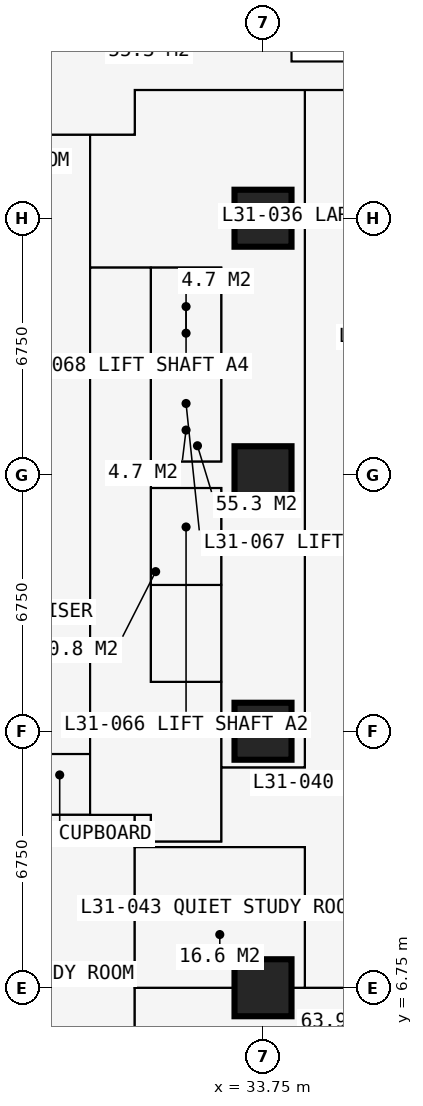
"""IFC4 building model, lengths in metres.
Left out: names, types, materials, properties, quantities, classifications, styles, units other than length and angle.
Written with IfcOpenShell. Run it as: python <this file> out.ifc"""

import sys

from ifc_helpers import new_model, si_unit, direction, frame, frame_2d, origin, origin_2d, place, context, subcontext, project, spatial, rectangle, extrude, element, fill, save


model = new_model("IFC4")
c1 = context("Model", 3, precision=1e-05, world=origin(), true_north=direction((0.0, 1.0)))
c2 = subcontext(c1, "Body", "Model", "MODEL_VIEW")
j1 = project(units=[si_unit("LENGTHUNIT", "METRE"), si_unit("PLANEANGLEUNIT", "RADIAN")], contexts=[c1])
p1 = place(None, origin())
s1 = spatial("IfcSite", under=j1, at=p1, CompositionType="ELEMENT")
p2 = place(p1, origin())
s2 = spatial("IfcBuilding", under=s1, at=p2, CompositionType="ELEMENT")
p3 = place(p2, frame((0.0, 0.0, 116.1)))
s3 = spatial("IfcBuildingStorey", under=s2, at=p3, CompositionType="ELEMENT", Elevation=116.1)
for number, where, z_axis, x_axis in (
    (1, (33.75, 6.75, 0.0), (0.0, 0.0, 1.0), (1.0, 0.0, 0.0)),
    (2, (33.75, 13.5, 0.0), (0.0, 0.0, 1.0), (1.0, 0.0, 0.0)),
    (3, (33.75, 20.25, 0.0), (0.0, 0.0, 1.0), (1.0, 0.0, 0.0)),
    (4, (33.75, 27.0, 0.0), (0.0, 0.0, 1.0), (1.0, 0.0, 0.0)),
):
    element("IfcColumn", number, at=place(p3, frame(where, z_axis=z_axis, x_axis=x_axis)), inside=s3, PredefinedType="COLUMN", context=c2, shape_type="SweptSolid", body=[
        extrude(rectangle(XDim=1.5, YDim=1.5, at=origin_2d()), origin(), (0.0, 0.0, 1.0), 3.6),
    ])
p4 = place(p3, frame((37.875, 31.125, 0.0), z_axis=(0.0, 0.0, 1.0), x_axis=(-1.0, 0.0, 0.0)))
e5 = element("IfcWall", 5, at=p4, inside=s3, PredefinedType="SOLIDWALL", context=c2, shape_type="SweptSolid", body=[
    extrude(rectangle(XDim=3.375, YDim=0.3, at=frame_2d((1.688, 0.0))), origin(), (0.0, 0.0, 1.0), 3.375),
])
p5 = place(p4, frame((0.788, 0.0, 0.6)))
e6 = element("IfcOpeningElement", 6, at=p5, cuts=e5, PredefinedType="OPENING", context=c2, shape_type="SweptSolid", body=[
    extrude(rectangle(XDim=1.8, YDim=2.1, at=frame_2d((0.9, 1.05))), frame((0.0, 0.16, 0.0), z_axis=(0.0, -1.0, 0.0), x_axis=(1.0, 0.0, 0.0)), (0.0, 0.0, 1.0), 0.32),
])
p6 = place(p3, frame((34.5, 31.125, 0.0), z_axis=(0.0, 0.0, 1.0), x_axis=(0.0, 1.0, 0.0)))
e7 = element("IfcWall", 7, at=p6, inside=s3, PredefinedType="SOLIDWALL", context=c2, shape_type="SweptSolid", body=[
    extrude(rectangle(XDim=3.375, YDim=0.3, at=frame_2d((1.688, 0.0))), origin(), (0.0, 0.0, 1.0), 3.375),
])
p7 = place(p6, frame((0.268, 0.0, 0.9)))
e8 = element("IfcOpeningElement", 8, at=p7, cuts=e7, PredefinedType="OPENING", context=c2, shape_type="SweptSolid", body=[
    extrude(rectangle(XDim=1.5, YDim=1.8, at=frame_2d((0.75, 0.9))), frame((0.0, 0.16, 0.0), z_axis=(0.0, -1.0, 0.0), x_axis=(1.0, 0.0, 0.0)), (0.0, 0.0, 1.0), 0.32),
])
p8 = place(p3, frame((10.125, 11.3, 0.0), z_axis=(0.0, 0.0, 1.0), x_axis=(1.0, 0.0, 0.0)))
e9 = element("IfcWall", 9, at=p8, inside=s3, PredefinedType="PARTITIONING", context=c2, shape_type="SweptSolid", body=[
    extrude(rectangle(XDim=20.675, YDim=0.15, at=frame_2d((10.337, 0.0))), origin(), (0.0, 0.0, 1.0), 3.375),
])
p9 = place(p8, frame((8.375, 0.0, 0.0)))
e10 = element("IfcOpeningElement", 10, at=p9, cuts=e9, PredefinedType="OPENING", context=c2, shape_type="SweptSolid", body=[
    extrude(rectangle(XDim=1.0, YDim=2.2, at=frame_2d((0.5, 1.1))), frame((0.0, 0.085, 0.0), z_axis=(0.0, -1.0, 0.0), x_axis=(1.0, 0.0, 0.0)), (0.0, 0.0, 1.0), 0.17),
])
p10 = place(p8, frame((10.975, 0.0, 0.0)))
e11 = element("IfcOpeningElement", 11, at=p10, cuts=e9, PredefinedType="OPENING", context=c2, shape_type="SweptSolid", body=[
    extrude(rectangle(XDim=1.0, YDim=2.2, at=frame_2d((0.5, 1.1))), frame((0.0, 0.085, 0.0), z_axis=(0.0, -1.0, 0.0), x_axis=(1.0, 0.0, 0.0)), (0.0, 0.0, 1.0), 0.17),
])
p11 = place(p8, frame((3.925, 0.0, 0.0)))
e12 = element("IfcOpeningElement", 12, at=p11, cuts=e9, PredefinedType="OPENING", context=c2, shape_type="SweptSolid", body=[
    extrude(rectangle(XDim=0.95, YDim=2.2, at=frame_2d((0.475, 1.1))), frame((0.0, 0.085, 0.0), z_axis=(0.0, -1.0, 0.0), x_axis=(1.0, 0.0, 0.0)), (0.0, 0.0, 1.0), 0.17),
])
p12 = place(p3, frame((11.3, 29.2, 0.0), z_axis=(0.0, 0.0, 1.0), x_axis=(1.0, 0.0, 0.0)))
e13 = element("IfcWall", 13, at=p12, inside=s3, PredefinedType="PARTITIONING", context=c2, shape_type="SweptSolid", body=[
    extrude(rectangle(XDim=19.075, YDim=0.15, at=frame_2d((9.538, 0.0))), origin(), (0.0, 0.0, 1.0), 3.375),
])
p13 = place(p12, frame((5.825, 0.0, 0.0)))
e14 = element("IfcOpeningElement", 14, at=p13, cuts=e13, PredefinedType="OPENING", context=c2, shape_type="SweptSolid", body=[
    extrude(rectangle(XDim=0.95, YDim=2.2, at=frame_2d((0.475, 1.1))), frame((0.0, 0.085, 0.0), z_axis=(0.0, -1.0, 0.0), x_axis=(1.0, 0.0, 0.0)), (0.0, 0.0, 1.0), 0.17),
])
p14 = place(p12, frame((9.2, 0.0, 0.0)))
e15 = element("IfcOpeningElement", 15, at=p14, cuts=e13, PredefinedType="OPENING", context=c2, shape_type="SweptSolid", body=[
    extrude(rectangle(XDim=0.95, YDim=2.2, at=frame_2d((0.475, 1.1))), frame((0.0, 0.085, 0.0), z_axis=(0.0, -1.0, 0.0), x_axis=(1.0, 0.0, 0.0)), (0.0, 0.0, 1.0), 0.17),
])
p15 = place(p12, frame((0.6, 0.0, 0.0)))
e16 = element("IfcOpeningElement", 16, at=p15, cuts=e13, PredefinedType="OPENING", context=c2, shape_type="SweptSolid", body=[
    extrude(rectangle(XDim=1.0, YDim=2.2, at=frame_2d((0.5, 1.1))), frame((0.0, 0.085, 0.0), z_axis=(0.0, -1.0, 0.0), x_axis=(1.0, 0.0, 0.0)), (0.0, 0.0, 1.0), 0.17),
])
p16 = place(p3, frame((27.6, 12.9, 0.0), z_axis=(0.0, 0.0, 1.0), x_axis=(1.0, 0.0, 0.0)))
e17 = element("IfcWall", 17, at=p16, inside=s3, PredefinedType="PARTITIONING", context=c2, shape_type="SweptSolid", body=[
    extrude(rectangle(XDim=1.6, YDim=0.15, at=frame_2d((0.8, 0.0))), origin(), (0.0, 0.0, 1.0), 2.806),
])
p17 = place(p3, frame((29.2, 11.3, 0.0), z_axis=(0.0, 0.0, 1.0), x_axis=(0.0, 1.0, 0.0)))
e18 = element("IfcWall", 18, at=p17, inside=s3, PredefinedType="PARTITIONING", context=c2, shape_type="SweptSolid", body=[
    extrude(rectangle(XDim=17.9, YDim=0.2, at=frame_2d((8.95, 0.0))), origin(), (0.0, 0.0, 1.0), 3.375),
])
p18 = place(p17, frame((8.35, 0.0, 0.0)))
e19 = element("IfcOpeningElement", 19, at=p18, cuts=e18, PredefinedType="OPENING", context=c2, shape_type="SweptSolid", body=[
    extrude(rectangle(XDim=1.2, YDim=2.2, at=frame_2d((0.6, 1.1))), frame((0.0, 0.11, 0.0), z_axis=(0.0, -1.0, 0.0), x_axis=(1.0, 0.0, 0.0)), (0.0, 0.0, 1.0), 0.22),
])
p19 = place(p3, frame((29.2, 25.7, 0.0), z_axis=(0.0, 0.0, 1.0), x_axis=(1.0, 0.0, 0.0)))
e20 = element("IfcWall", 20, at=p19, inside=s3, PredefinedType="SHEAR", context=c2, shape_type="SweptSolid", body=[
    extrude(rectangle(XDim=3.45, YDim=0.1, at=frame_2d((1.725, 0.0))), origin(), (0.0, 0.0, 1.0), 3.375),
])
p20 = place(p3, frame((30.375, -0.734, 0.0), z_axis=(0.0, 0.0, 1.0), x_axis=(0.0, 1.0, 0.0)))
e21 = element("IfcWall", 21, at=p20, inside=s3, PredefinedType="PARTITIONING", context=c2, shape_type="SweptSolid", body=[
    extrude(rectangle(XDim=12.034, YDim=0.15, at=frame_2d((6.017, 0.0))), origin(), (0.0, 0.0, 1.0), 3.375),
])
p21 = place(p20, frame((5.134, 0.0, 0.0)))
e22 = element("IfcOpeningElement", 22, at=p21, cuts=e21, PredefinedType="OPENING", context=c2, shape_type="SweptSolid", body=[
    extrude(rectangle(XDim=1.0, YDim=2.2, at=frame_2d((0.5, 1.1))), frame((0.0, 0.085, 0.0), z_axis=(0.0, -1.0, 0.0), x_axis=(1.0, 0.0, 0.0)), (0.0, 0.0, 1.0), 0.17),
])
p22 = place(p3, frame((30.375, 6.75, 0.0), z_axis=(0.0, 0.0, 1.0), x_axis=(1.0, 0.0, 0.0)))
e23 = element("IfcWall", 23, at=p22, inside=s3, PredefinedType="PARTITIONING", context=c2, shape_type="SweptSolid", body=[
    extrude(rectangle(XDim=5.975, YDim=0.15, at=frame_2d((2.988, 0.0))), origin(), (0.0, 0.0, 1.0), 2.877),
])
p23 = place(p3, frame((30.375, 10.45, 0.0), z_axis=(0.0, 0.0, 1.0), x_axis=(1.0, 0.0, 0.0)))
e24 = element("IfcWall", 24, at=p23, inside=s3, PredefinedType="PARTITIONING", context=c2, shape_type="SweptSolid", body=[
    extrude(rectangle(XDim=4.475, YDim=0.15, at=frame_2d((2.238, 0.0))), origin(), (0.0, 0.0, 1.0), 3.375),
])
p24 = place(p23, frame((2.35, 0.0, 0.0)))
e25 = element("IfcOpeningElement", 25, at=p24, cuts=e24, PredefinedType="OPENING", context=c2, shape_type="SweptSolid", body=[
    extrude(rectangle(XDim=0.95, YDim=2.2, at=frame_2d((0.475, 1.1))), frame((0.0, 0.085, 0.0), z_axis=(0.0, -1.0, 0.0), x_axis=(1.0, 0.0, 0.0)), (0.0, 0.0, 1.0), 0.17),
])
p25 = place(p3, frame((30.375, 29.2, 0.0), z_axis=(0.0, 0.0, 1.0), x_axis=(0.0, 1.0, 0.0)))
e26 = element("IfcWall", 26, at=p25, inside=s3, PredefinedType="PARTITIONING", context=c2, shape_type="SweptSolid", body=[
    extrude(rectangle(XDim=1.175, YDim=0.15, at=frame_2d((0.587, 0.0))), origin(), (0.0, 0.0, 1.0), 3.375),
])
p26 = place(p3, frame((30.375, 30.375, 0.0), z_axis=(0.0, 0.0, 1.0), x_axis=(1.0, 0.0, 0.0)))
e27 = element("IfcWall", 27, at=p26, inside=s3, PredefinedType="PARTITIONING", context=c2, shape_type="SweptSolid", body=[
    extrude(rectangle(XDim=7.35, YDim=0.15, at=frame_2d((3.675, 0.0))), origin(), (0.0, 0.0, 1.0), 2.877),
])
p27 = place(p26, frame((5.225, 0.0, 0.0)))
e28 = element("IfcOpeningElement", 28, at=p27, cuts=e27, PredefinedType="OPENING", context=c2, shape_type="SweptSolid", body=[
    extrude(rectangle(XDim=1.0, YDim=2.2, at=frame_2d((0.5, 1.1))), frame((0.0, 0.085, 0.0), z_axis=(0.0, -1.0, 0.0), x_axis=(1.0, 0.0, 0.0)), (0.0, 0.0, 1.0), 0.17),
])
p28 = place(p3, frame((30.8, 10.6, 0.0), z_axis=(0.0, 0.0, 1.0), x_axis=(0.0, 1.0, 0.0)))
e29 = element("IfcWall", 29, at=p28, inside=s3, PredefinedType="PARTITIONING", context=c2, shape_type="SweptSolid", body=[
    extrude(rectangle(XDim=0.7, YDim=0.15, at=frame_2d((0.35, 0.0))), origin(), (0.0, 0.0, 1.0), 3.375),
])
p29 = place(p3, frame((30.8, 10.6, 0.0), z_axis=(0.0, 0.0, 1.0), x_axis=(1.0, 0.0, 0.0)))
e30 = element("IfcWall", 30, at=p29, inside=s3, PredefinedType="PARTITIONING", context=c2, shape_type="SweptSolid", body=[
    extrude(rectangle(XDim=1.85, YDim=0.15, at=frame_2d((0.925, 0.0))), origin(), (0.0, 0.0, 1.0), 3.375),
])
p30 = place(p3, frame((30.8, 14.8, 0.0), z_axis=(0.0, 0.0, 1.0), x_axis=(0.0, 1.0, 0.0)))
e31 = element("IfcWall", 31, at=p30, inside=s3, PredefinedType="PARTITIONING", context=c2, shape_type="SweptSolid", body=[
    extrude(rectangle(XDim=10.9, YDim=0.15, at=frame_2d((5.45, 0.0))), origin(), (0.0, 0.0, 1.0), 3.375),
])
p31 = place(p30, frame((0.75, 0.0, 0.0)))
e32 = element("IfcOpeningElement", 32, at=p31, cuts=e31, PredefinedType="OPENING", context=c2, shape_type="SweptSolid", body=[
    extrude(rectangle(XDim=1.1, YDim=2.2, at=frame_2d((0.55, 1.1))), frame((0.0, 0.085, 0.0), z_axis=(0.0, -1.0, 0.0), x_axis=(1.0, 0.0, 0.0)), (0.0, 0.0, 1.0), 0.17),
])
p32 = place(p30, frame((3.25, 0.0, 0.0)))
e33 = element("IfcOpeningElement", 33, at=p32, cuts=e31, PredefinedType="OPENING", context=c2, shape_type="SweptSolid", body=[
    extrude(rectangle(XDim=1.1, YDim=2.2, at=frame_2d((0.55, 1.1))), frame((0.0, 0.085, 0.0), z_axis=(0.0, -1.0, 0.0), x_axis=(1.0, 0.0, 0.0)), (0.0, 0.0, 1.0), 0.17),
])
p33 = place(p30, frame((6.5, 0.0, 0.0)))
e34 = element("IfcOpeningElement", 34, at=p33, cuts=e31, PredefinedType="OPENING", context=c2, shape_type="SweptSolid", body=[
    extrude(rectangle(XDim=1.1, YDim=2.2, at=frame_2d((0.55, 1.1))), frame((0.0, 0.085, 0.0), z_axis=(0.0, -1.0, 0.0), x_axis=(1.0, 0.0, 0.0)), (0.0, 0.0, 1.0), 0.17),
])
p34 = place(p30, frame((9.05, 0.0, 0.0)))
e35 = element("IfcOpeningElement", 35, at=p34, cuts=e31, PredefinedType="OPENING", context=c2, shape_type="SweptSolid", body=[
    extrude(rectangle(XDim=1.1, YDim=2.2, at=frame_2d((0.55, 1.1))), frame((0.0, 0.085, 0.0), z_axis=(0.0, -1.0, 0.0), x_axis=(1.0, 0.0, 0.0)), (0.0, 0.0, 1.0), 0.17),
])
for number, where, z_axis, x_axis in (
    (36, (30.8, 14.8, 0.0), (0.0, 0.0, 1.0), (1.0, 0.0, 0.0)),
    (37, (30.8, 17.35, 0.0), (0.0, 0.0, 1.0), (1.0, 0.0, 0.0)),
    (38, (30.8, 19.9, 0.0), (0.0, 0.0, 1.0), (1.0, 0.0, 0.0)),
    (39, (30.8, 20.6, 0.0), (0.0, 0.0, 1.0), (1.0, 0.0, 0.0)),
    (40, (30.8, 23.15, 0.0), (0.0, 0.0, 1.0), (1.0, 0.0, 0.0)),
):
    element("IfcWall", number, at=place(p3, frame(where, z_axis=z_axis, x_axis=x_axis)), inside=s3, PredefinedType="SHEAR", context=c2, shape_type="SweptSolid", body=[
        extrude(rectangle(XDim=1.85, YDim=0.1, at=frame_2d((0.925, 0.0))), origin(), (0.0, 0.0, 1.0), 3.375),
    ])
p35 = place(p3, frame((32.65, 10.6, 0.0), z_axis=(0.0, 0.0, 1.0), x_axis=(0.0, 1.0, 0.0)))
e41 = element("IfcWall", 41, at=p35, inside=s3, PredefinedType="SHEAR", context=c2, shape_type="SweptSolid", body=[
    extrude(rectangle(XDim=9.3, YDim=0.1, at=frame_2d((4.65, 0.0))), origin(), (0.0, 0.0, 1.0), 3.375),
])
p36 = place(p35, frame((0.5, 0.0, 0.0)))
e42 = element("IfcOpeningElement", 42, at=p36, cuts=e41, PredefinedType="OPENING", context=c2, shape_type="SweptSolid", body=[
    extrude(rectangle(XDim=1.0, YDim=2.2, at=frame_2d((0.5, 1.1))), frame((0.0, 0.06, 0.0), z_axis=(0.0, -1.0, 0.0), x_axis=(1.0, 0.0, 0.0)), (0.0, 0.0, 1.0), 0.12),
])
p37 = place(p3, frame((32.65, 12.55, 0.0), z_axis=(0.0, 0.0, 1.0), x_axis=(1.0, 0.0, 0.0)))
e43 = element("IfcWall", 43, at=p37, inside=s3, PredefinedType="PARTITIONING", context=c2, shape_type="SweptSolid", body=[
    extrude(rectangle(XDim=2.2, YDim=0.15, at=frame_2d((1.1, 0.0))), origin(), (0.0, 0.0, 1.0), 3.375),
])
p38 = place(p3, frame((32.65, 20.6, 0.0), z_axis=(0.0, 0.0, 1.0), x_axis=(0.0, 1.0, 0.0)))
e44 = element("IfcWall", 44, at=p38, inside=s3, PredefinedType="PARTITIONING", context=c2, shape_type="SweptSolid", body=[
    extrude(rectangle(XDim=5.1, YDim=0.15, at=frame_2d((2.55, 0.0))), origin(), (0.0, 0.0, 1.0), 3.375),
])
p39 = place(p3, frame((34.85, 6.75, 0.0), z_axis=(0.0, 0.0, 1.0), x_axis=(0.0, 1.0, 0.0)))
e45 = element("IfcWall", 45, at=p39, inside=s3, PredefinedType="PARTITIONING", context=c2, shape_type="SweptSolid", body=[
    extrude(rectangle(XDim=3.7, YDim=0.15, at=frame_2d((1.85, 0.0))), origin(), (0.0, 0.0, 1.0), 3.375),
])
p40 = place(p3, frame((34.85, 12.55, 0.0), z_axis=(0.0, 0.0, 1.0), x_axis=(0.0, 1.0, 0.0)))
e46 = element("IfcWall", 46, at=p40, inside=s3, PredefinedType="PARTITIONING", context=c2, shape_type="SweptSolid", body=[
    extrude(rectangle(XDim=17.825, YDim=0.15, at=frame_2d((8.913, 0.0))), origin(), (0.0, 0.0, 1.0), 3.375),
])
p41 = place(p40, frame((8.5, 0.0, 0.0)))
e47 = element("IfcOpeningElement", 47, at=p41, cuts=e46, PredefinedType="OPENING", context=c2, shape_type="SweptSolid", body=[
    extrude(rectangle(XDim=0.95, YDim=2.2, at=frame_2d((0.475, 1.1))), frame((0.0, 0.085, 0.0), z_axis=(0.0, -1.0, 0.0), x_axis=(1.0, 0.0, 0.0)), (0.0, 0.0, 1.0), 0.17),
])
p42 = place(p5, origin())
e48 = element("IfcWindow", 48, at=p42, inside=s3, PartitioningType="SINGLE_PANEL", PredefinedType="WINDOW", context=c2, shape_type="SweptSolid", body=[
    extrude(rectangle(XDim=1.8, YDim=2.1, at=frame_2d((0.9, 1.05))), frame((0.0, 0.03, 0.0), z_axis=(0.0, -1.0, 0.0), x_axis=(1.0, 0.0, 0.0)), (0.0, 0.0, 1.0), 0.06),
])
fill(e6, e48)
p43 = place(p36, origin())
e49 = element("IfcDoor", 49, at=p43, inside=s3, OperationType="SINGLE_SWING_LEFT", PredefinedType="DOOR", context=c2, shape_type="SweptSolid", body=[
    extrude(rectangle(XDim=1.0, YDim=2.2, at=frame_2d((0.5, 1.1))), frame((0.0, 0.025, 0.0), z_axis=(0.0, -1.0, 0.0), x_axis=(1.0, 0.0, 0.0)), (0.0, 0.0, 1.0), 0.05),
])
fill(e42, e49)
p44 = place(p41, origin())
e50 = element("IfcDoor", 50, at=p44, inside=s3, OperationType="SINGLE_SWING_LEFT", PredefinedType="DOOR", context=c2, shape_type="SweptSolid", body=[
    extrude(rectangle(XDim=0.95, YDim=2.2, at=frame_2d((0.475, 1.1))), frame((0.0, 0.025, 0.0), z_axis=(0.0, -1.0, 0.0), x_axis=(1.0, 0.0, 0.0)), (0.0, 0.0, 1.0), 0.05),
])
fill(e47, e50)
p45 = place(p24, origin())
e51 = element("IfcDoor", 51, at=p45, inside=s3, OperationType="SINGLE_SWING_LEFT", PredefinedType="DOOR", context=c2, shape_type="SweptSolid", body=[
    extrude(rectangle(XDim=0.95, YDim=2.2, at=frame_2d((0.475, 1.1))), frame((0.0, 0.025, 0.0), z_axis=(0.0, -1.0, 0.0), x_axis=(1.0, 0.0, 0.0)), (0.0, 0.0, 1.0), 0.05),
])
fill(e25, e51)
p46 = place(p27, origin())
e52 = element("IfcDoor", 52, at=p46, inside=s3, OperationType="SINGLE_SWING_LEFT", PredefinedType="DOOR", context=c2, shape_type="SweptSolid", body=[
    extrude(rectangle(XDim=1.0, YDim=2.2, at=frame_2d((0.5, 1.1))), frame((0.0, 0.025, 0.0), z_axis=(0.0, -1.0, 0.0), x_axis=(1.0, 0.0, 0.0)), (0.0, 0.0, 1.0), 0.05),
])
fill(e28, e52)
p47 = place(p31, origin())
e53 = element("IfcDoor", 53, at=p47, inside=s3, OperationType="DOUBLE_DOOR_SLIDING", PredefinedType="DOOR", context=c2, shape_type="SweptSolid", body=[
    extrude(rectangle(XDim=1.1, YDim=2.2, at=frame_2d((0.55, 1.1))), frame((0.0, 0.025, 0.0), z_axis=(0.0, -1.0, 0.0), x_axis=(1.0, 0.0, 0.0)), (0.0, 0.0, 1.0), 0.05),
])
fill(e32, e53)
p48 = place(p32, origin())
e54 = element("IfcDoor", 54, at=p48, inside=s3, OperationType="DOUBLE_DOOR_SLIDING", PredefinedType="DOOR", context=c2, shape_type="SweptSolid", body=[
    extrude(rectangle(XDim=1.1, YDim=2.2, at=frame_2d((0.55, 1.1))), frame((0.0, 0.025, 0.0), z_axis=(0.0, -1.0, 0.0), x_axis=(1.0, 0.0, 0.0)), (0.0, 0.0, 1.0), 0.05),
])
fill(e33, e54)
p49 = place(p33, origin())
e55 = element("IfcDoor", 55, at=p49, inside=s3, OperationType="DOUBLE_DOOR_SLIDING", PredefinedType="DOOR", context=c2, shape_type="SweptSolid", body=[
    extrude(rectangle(XDim=1.1, YDim=2.2, at=frame_2d((0.55, 1.1))), frame((0.0, 0.025, 0.0), z_axis=(0.0, -1.0, 0.0), x_axis=(1.0, 0.0, 0.0)), (0.0, 0.0, 1.0), 0.05),
])
fill(e34, e55)
p50 = place(p34, origin())
e56 = element("IfcDoor", 56, at=p50, inside=s3, OperationType="DOUBLE_DOOR_SLIDING", PredefinedType="DOOR", context=c2, shape_type="SweptSolid", body=[
    extrude(rectangle(XDim=1.1, YDim=2.2, at=frame_2d((0.55, 1.1))), frame((0.0, 0.025, 0.0), z_axis=(0.0, -1.0, 0.0), x_axis=(1.0, 0.0, 0.0)), (0.0, 0.0, 1.0), 0.05),
])
fill(e35, e56)
p51 = place(p18, origin())
e57 = element("IfcDoor", 57, at=p51, inside=s3, OperationType="DOUBLE_DOOR_SINGLE_SWING", PredefinedType="DOOR", context=c2, shape_type="SweptSolid", body=[
    extrude(rectangle(XDim=1.2, YDim=2.2, at=frame_2d((0.6, 1.1))), frame((0.0, 0.025, 0.0), z_axis=(0.0, -1.0, 0.0), x_axis=(1.0, 0.0, 0.0)), (0.0, 0.0, 1.0), 0.05),
])
fill(e19, e57)
save(model, sys.argv[1])
